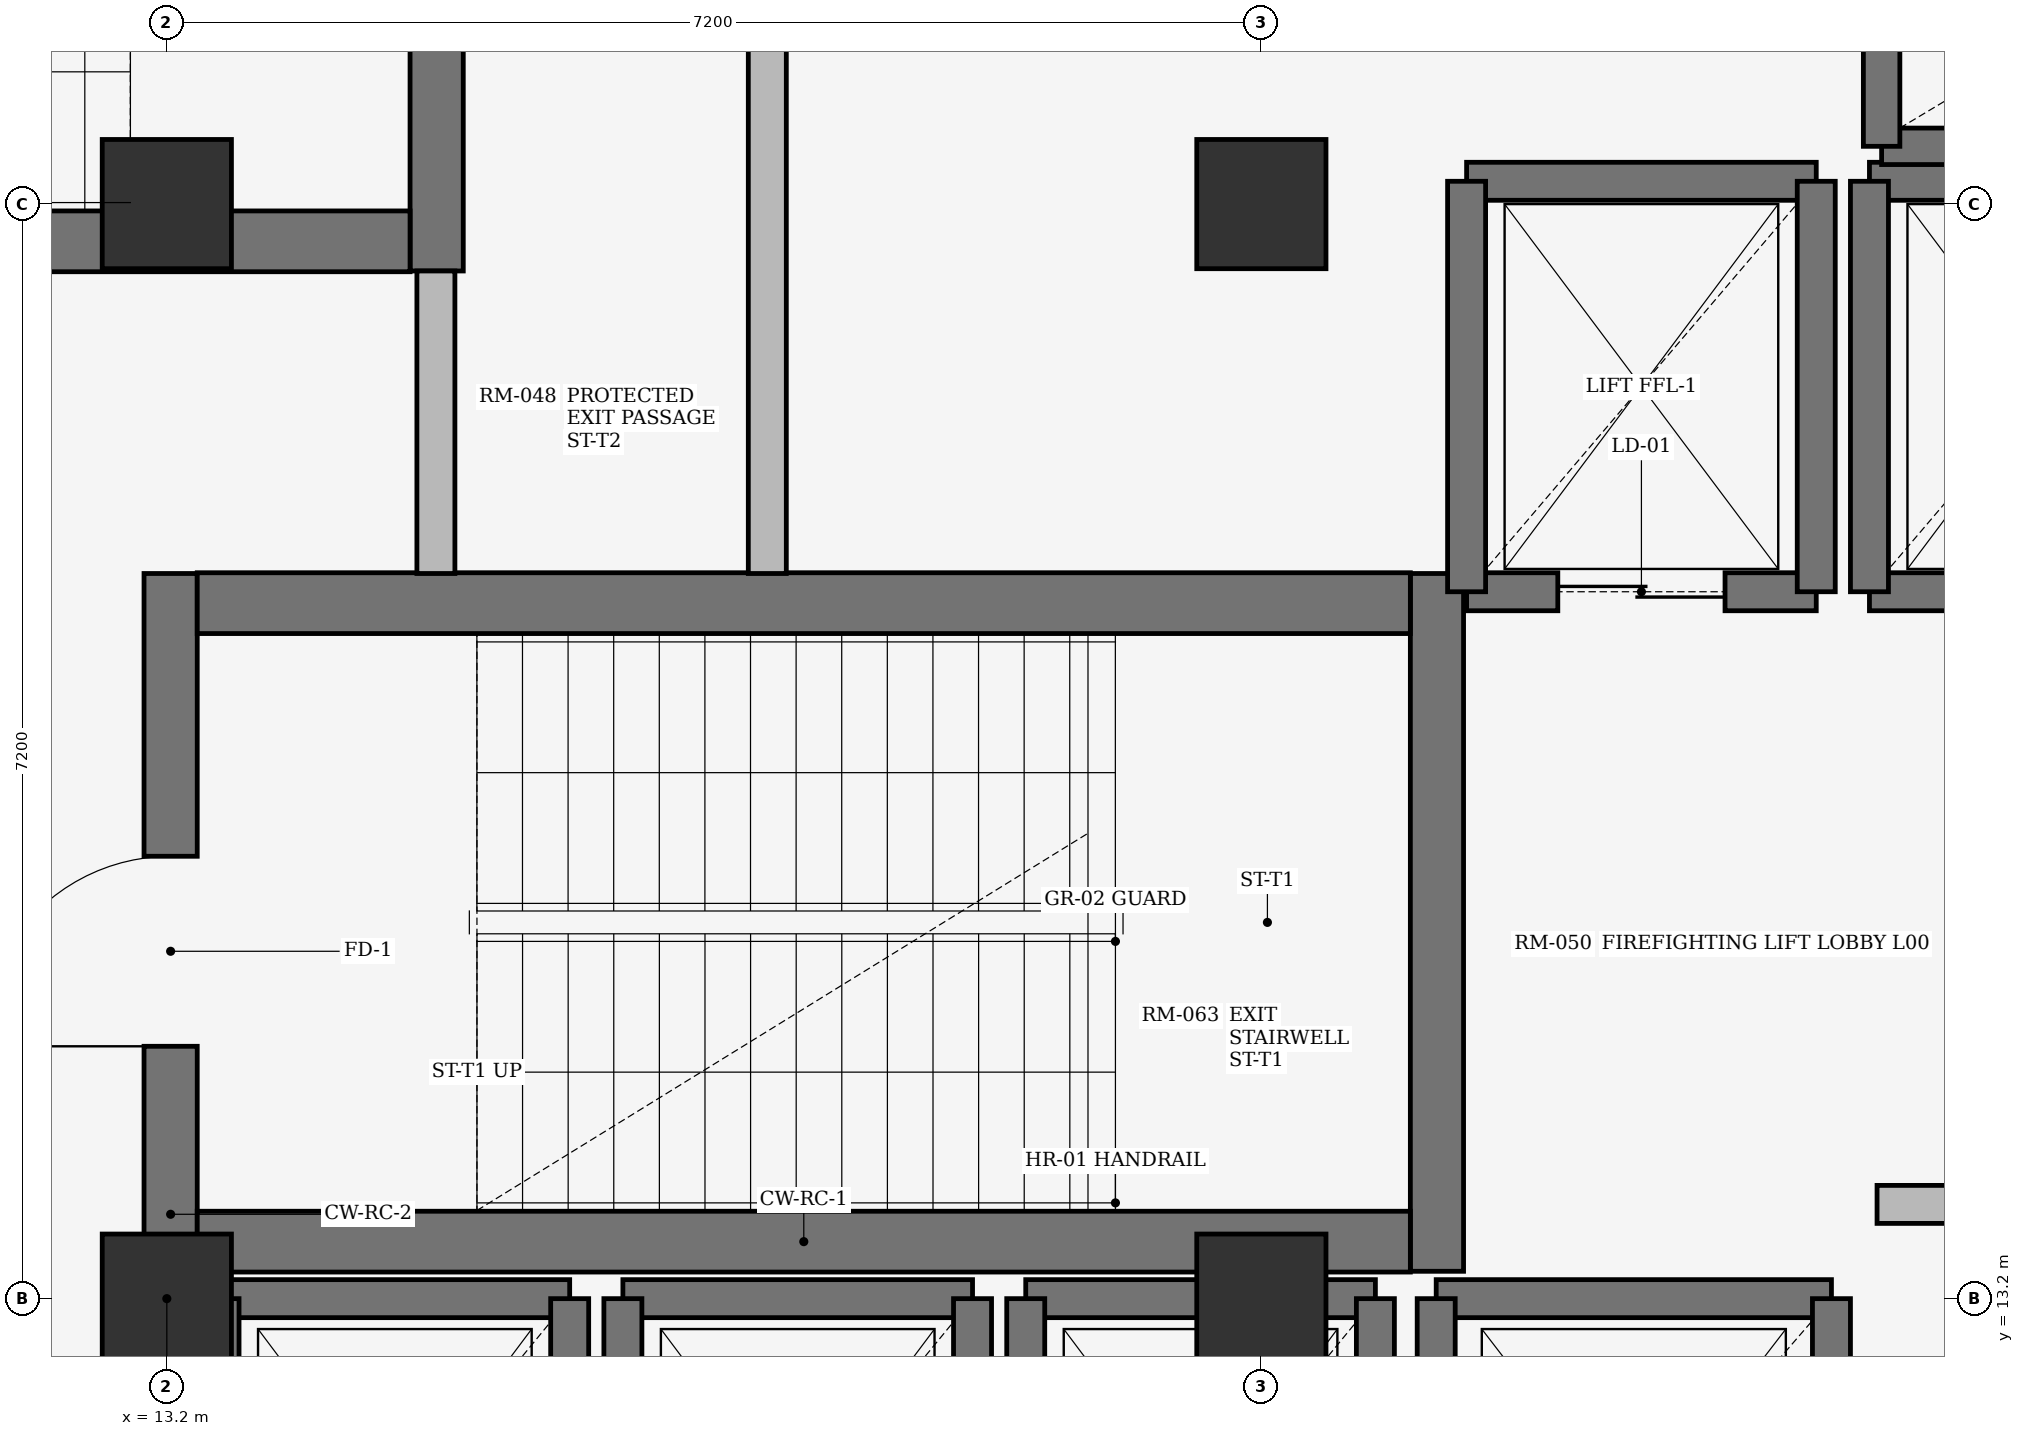
"""IFC4 building model, lengths in metres.
Left out: names, types, materials, properties, quantities, classifications, styles, units other than length and angle.
Written with IfcOpenShell. Run it as: python <this file> out.ifc"""

import sys

from ifc_helpers import new_model, si_unit, direction, frame, frame_2d, origin, origin_2d, place, context, subcontext, project, spatial, rectangle, extrude, element, fill, save


model = new_model("IFC4")
c1 = context("Model", 3, precision=1e-05, world=origin(), true_north=direction((0.0, 1.0)))
c2 = subcontext(c1, "Body", "Model", "MODEL_VIEW")
j1 = project(units=[si_unit("LENGTHUNIT", "METRE"), si_unit("PLANEANGLEUNIT", "RADIAN")], contexts=[c1])
p1 = place(None, origin())
s1 = spatial("IfcSite", under=j1, at=p1, CompositionType="ELEMENT")
p2 = place(p1, origin())
s2 = spatial("IfcBuilding", under=s1, at=p2, CompositionType="ELEMENT")
p3 = place(p2, origin())
s3 = spatial("IfcBuildingStorey", under=s2, at=p3, CompositionType="ELEMENT", Elevation=0.0)
for number, where, z_axis, x_axis in (
    (1, (13.2, 13.2, 0.0), (0.0, 0.0, 1.0), (1.0, 0.0, 0.0)),
    (2, (13.2, 20.4, 0.0), (0.0, 0.0, 1.0), (1.0, 0.0, 0.0)),
    (3, (20.4, 13.2, 0.0), (0.0, 0.0, 1.0), (1.0, 0.0, 0.0)),
    (4, (20.4, 20.4, 0.0), (0.0, 0.0, 1.0), (1.0, 0.0, 0.0)),
):
    element("IfcColumn", number, at=place(p3, frame(where, z_axis=z_axis, x_axis=x_axis)), inside=s3, PredefinedType="COLUMN", context=c2, shape_type="SweptSolid", body=[
        extrude(rectangle(XDim=0.85, YDim=0.85, at=origin_2d()), origin(), (0.0, 0.0, 1.0), 4.48),
    ])
p4 = place(p3, frame((13.225, 13.0, 0.0), z_axis=(0.0, 0.0, 1.0), x_axis=(0.0, 1.0, 0.0)))
e5 = element("IfcWall", 5, at=p4, inside=s3, PredefinedType="SHEAR", context=c2, shape_type="SweptSolid", body=[
    extrude(rectangle(XDim=4.97, YDim=0.35, at=frame_2d((2.485, 0.0))), origin(), (0.0, 0.0, 1.0), 4.48),
])
p5 = place(p4, frame((1.86, 0.0, 0.0)))
e6 = element("IfcOpeningElement", 6, at=p5, cuts=e5, PredefinedType="OPENING", context=c2, shape_type="SweptSolid", body=[
    extrude(rectangle(XDim=1.25, YDim=2.2, at=frame_2d((0.625, 1.1))), frame((0.0, 0.185, 0.0), z_axis=(0.0, -1.0, 0.0), x_axis=(1.0, 0.0, 0.0)), (0.0, 0.0, 1.0), 0.37),
])
p6 = place(p3, frame((21.555, 13.38, 0.0), z_axis=(0.0, 0.0, 1.0), x_axis=(0.0, 1.0, 0.0)))
e7 = element("IfcWall", 7, at=p6, inside=s3, PredefinedType="SHEAR", context=c2, shape_type="SweptSolid", body=[
    extrude(rectangle(XDim=4.59, YDim=0.35, at=frame_2d((2.295, 0.0))), origin(), (0.0, 0.0, 1.0), 4.48),
])
for number, where, z_axis, x_axis in (
    (8, (13.4, 13.575, 0.0), (0.0, 0.0, 1.0), (1.0, 0.0, 0.0)),
    (9, (13.4, 17.775, 0.0), (0.0, 0.0, 1.0), (1.0, 0.0, 0.0)),
):
    element("IfcWall", number, at=place(p3, frame(where, z_axis=z_axis, x_axis=x_axis)), inside=s3, PredefinedType="SHEAR", context=c2, shape_type="SweptSolid", body=[
        extrude(rectangle(XDim=7.98, YDim=0.4, at=frame_2d((3.99, 0.0))), origin(), (0.0, 0.0, 1.0), 4.48),
    ])
p7 = place(p3, frame((14.975, 24.55, 0.0), z_axis=(0.0, 0.0, 1.0), x_axis=(0.0, -1.0, 0.0)))
e10 = element("IfcWall", 10, at=p7, inside=s3, PredefinedType="SHEAR", context=c2, shape_type="SweptSolid", body=[
    extrude(rectangle(XDim=4.59, YDim=0.35, at=frame_2d((2.295, 0.0))), origin(), (0.0, 0.0, 1.0), 4.48),
])
p8 = place(p7, frame((1.72, 0.0, 0.0)))
e11 = element("IfcOpeningElement", 11, at=p8, cuts=e10, PredefinedType="OPENING", context=c2, shape_type="SweptSolid", body=[
    extrude(rectangle(XDim=1.15, YDim=2.2, at=frame_2d((0.575, 1.1))), frame((0.0, 0.185, 0.0), z_axis=(0.0, -1.0, 0.0), x_axis=(1.0, 0.0, 0.0)), (0.0, 0.0, 1.0), 0.37),
])
p9 = place(p3, frame((14.8, 20.155, 0.0), z_axis=(0.0, 0.0, 1.0), x_axis=(-1.0, 0.0, 0.0)))
e12 = element("IfcWall", 12, at=p9, inside=s3, PredefinedType="SHEAR", context=c2, shape_type="SweptSolid", body=[
    extrude(rectangle(XDim=7.98, YDim=0.4, at=frame_2d((3.99, 0.0))), origin(), (0.0, 0.0, 1.0), 4.48),
])
p10 = place(p3, frame((21.75, 17.85, 0.0), z_axis=(0.0, 0.0, 1.0), x_axis=(1.0, 0.0, 0.0)))
e13 = element("IfcWall", 13, at=p10, inside=s3, PredefinedType="SHEAR", context=c2, shape_type="SweptSolid", body=[
    extrude(rectangle(XDim=2.3, YDim=0.25, at=frame_2d((1.15, 0.0))), origin(), (0.0, 0.0, 1.0), 4.48),
])
p11 = place(p10, frame((0.6, 0.0, 0.0)))
e14 = element("IfcOpeningElement", 14, at=p11, cuts=e13, PredefinedType="OPENING", context=c2, shape_type="SweptSolid", body=[
    extrude(rectangle(XDim=1.1, YDim=2.2, at=frame_2d((0.55, 1.1))), frame((0.0, 0.135, 0.0), z_axis=(0.0, -1.0, 0.0), x_axis=(1.0, 0.0, 0.0)), (0.0, 0.0, 1.0), 0.27),
])
p12 = place(p3, frame((21.75, 20.55, 0.0), z_axis=(0.0, 0.0, 1.0), x_axis=(1.0, 0.0, 0.0)))
e15 = element("IfcWall", 15, at=p12, inside=s3, PredefinedType="SHEAR", context=c2, shape_type="SweptSolid", body=[
    extrude(rectangle(XDim=2.3, YDim=0.25, at=frame_2d((1.15, 0.0))), origin(), (0.0, 0.0, 1.0), 4.48),
])
for number, where, z_axis, x_axis in (
    (16, (21.75, 17.85, 0.0), (0.0, 0.0, 1.0), (0.0, 1.0, 0.0)),
    (17, (24.05, 17.85, 0.0), (0.0, 0.0, 1.0), (0.0, 1.0, 0.0)),
):
    element("IfcWall", number, at=place(p3, frame(where, z_axis=z_axis, x_axis=x_axis)), inside=s3, PredefinedType="SHEAR", context=c2, shape_type="SweptSolid", body=[
        extrude(rectangle(XDim=2.7, YDim=0.25, at=frame_2d((1.35, 0.0))), origin(), (0.0, 0.0, 1.0), 4.48),
    ])
p13 = place(p3, frame((24.4, 17.85, 0.0), z_axis=(0.0, 0.0, 1.0), x_axis=(1.0, 0.0, 0.0)))
e18 = element("IfcWall", 18, at=p13, inside=s3, PredefinedType="SHEAR", context=c2, shape_type="SweptSolid", body=[
    extrude(rectangle(XDim=2.3, YDim=0.25, at=frame_2d((1.15, 0.0))), origin(), (0.0, 0.0, 1.0), 4.48),
])
p14 = place(p13, frame((0.6, 0.0, 0.0)))
e19 = element("IfcOpeningElement", 19, at=p14, cuts=e18, PredefinedType="OPENING", context=c2, shape_type="SweptSolid", body=[
    extrude(rectangle(XDim=1.1, YDim=2.2, at=frame_2d((0.55, 1.1))), frame((0.0, 0.135, 0.0), z_axis=(0.0, -1.0, 0.0), x_axis=(1.0, 0.0, 0.0)), (0.0, 0.0, 1.0), 0.27),
])
p15 = place(p3, frame((24.4, 20.55, 0.0), z_axis=(0.0, 0.0, 1.0), x_axis=(1.0, 0.0, 0.0)))
e20 = element("IfcWall", 20, at=p15, inside=s3, PredefinedType="SHEAR", context=c2, shape_type="SweptSolid", body=[
    extrude(rectangle(XDim=2.3, YDim=0.25, at=frame_2d((1.15, 0.0))), origin(), (0.0, 0.0, 1.0), 4.48),
])
p16 = place(p3, frame((24.4, 17.85, 0.0), z_axis=(0.0, 0.0, 1.0), x_axis=(0.0, 1.0, 0.0)))
e21 = element("IfcWall", 21, at=p16, inside=s3, PredefinedType="SHEAR", context=c2, shape_type="SweptSolid", body=[
    extrude(rectangle(XDim=2.7, YDim=0.25, at=frame_2d((1.35, 0.0))), origin(), (0.0, 0.0, 1.0), 4.48),
])
p17 = place(p3, frame((13.55, 13.2, 0.0), z_axis=(0.0, 0.0, 1.0), x_axis=(1.0, 0.0, 0.0)))
e22 = element("IfcWall", 22, at=p17, inside=s3, PredefinedType="SHEAR", context=c2, shape_type="SweptSolid", body=[
    extrude(rectangle(XDim=2.3, YDim=0.25, at=frame_2d((1.15, 0.0))), origin(), (0.0, 0.0, 1.0), 4.48),
])
for number, where, z_axis, x_axis in (
    (23, (13.55, 10.4, 0.0), (0.0, 0.0, 1.0), (0.0, 1.0, 0.0)),
    (24, (15.85, 10.4, 0.0), (0.0, 0.0, 1.0), (0.0, 1.0, 0.0)),
):
    element("IfcWall", number, at=place(p3, frame(where, z_axis=z_axis, x_axis=x_axis)), inside=s3, PredefinedType="SHEAR", context=c2, shape_type="SweptSolid", body=[
        extrude(rectangle(XDim=2.8, YDim=0.25, at=frame_2d((1.4, 0.0))), origin(), (0.0, 0.0, 1.0), 4.48),
    ])
p18 = place(p3, frame((16.2, 13.2, 0.0), z_axis=(0.0, 0.0, 1.0), x_axis=(1.0, 0.0, 0.0)))
e25 = element("IfcWall", 25, at=p18, inside=s3, PredefinedType="SHEAR", context=c2, shape_type="SweptSolid", body=[
    extrude(rectangle(XDim=2.3, YDim=0.25, at=frame_2d((1.15, 0.0))), origin(), (0.0, 0.0, 1.0), 4.48),
])
for number, where, z_axis, x_axis in (
    (26, (16.2, 10.4, 0.0), (0.0, 0.0, 1.0), (0.0, 1.0, 0.0)),
    (27, (18.5, 10.4, 0.0), (0.0, 0.0, 1.0), (0.0, 1.0, 0.0)),
):
    element("IfcWall", number, at=place(p3, frame(where, z_axis=z_axis, x_axis=x_axis)), inside=s3, PredefinedType="SHEAR", context=c2, shape_type="SweptSolid", body=[
        extrude(rectangle(XDim=2.8, YDim=0.25, at=frame_2d((1.4, 0.0))), origin(), (0.0, 0.0, 1.0), 4.48),
    ])
p19 = place(p3, frame((18.85, 13.2, 0.0), z_axis=(0.0, 0.0, 1.0), x_axis=(1.0, 0.0, 0.0)))
e28 = element("IfcWall", 28, at=p19, inside=s3, PredefinedType="SHEAR", context=c2, shape_type="SweptSolid", body=[
    extrude(rectangle(XDim=2.3, YDim=0.25, at=frame_2d((1.15, 0.0))), origin(), (0.0, 0.0, 1.0), 4.48),
])
for number, where, z_axis, x_axis in (
    (29, (18.85, 10.4, 0.0), (0.0, 0.0, 1.0), (0.0, 1.0, 0.0)),
    (30, (21.15, 10.4, 0.0), (0.0, 0.0, 1.0), (0.0, 1.0, 0.0)),
):
    element("IfcWall", number, at=place(p3, frame(where, z_axis=z_axis, x_axis=x_axis)), inside=s3, PredefinedType="SHEAR", context=c2, shape_type="SweptSolid", body=[
        extrude(rectangle(XDim=2.8, YDim=0.25, at=frame_2d((1.4, 0.0))), origin(), (0.0, 0.0, 1.0), 4.48),
    ])
p20 = place(p3, frame((21.55, 13.2, 0.0), z_axis=(0.0, 0.0, 1.0), x_axis=(1.0, 0.0, 0.0)))
e31 = element("IfcWall", 31, at=p20, inside=s3, PredefinedType="SHEAR", context=c2, shape_type="SweptSolid", body=[
    extrude(rectangle(XDim=2.6, YDim=0.25, at=frame_2d((1.3, 0.0))), origin(), (0.0, 0.0, 1.0), 4.48),
])
for number, where, z_axis, x_axis in (
    (32, (21.55, 10.2, 0.0), (0.0, 0.0, 1.0), (0.0, 1.0, 0.0)),
    (33, (24.15, 10.2, 0.0), (0.0, 0.0, 1.0), (0.0, 1.0, 0.0)),
):
    element("IfcWall", number, at=place(p3, frame(where, z_axis=z_axis, x_axis=x_axis)), inside=s3, PredefinedType="SHEAR", context=c2, shape_type="SweptSolid", body=[
        extrude(rectangle(XDim=3.0, YDim=0.25, at=frame_2d((1.5, 0.0))), origin(), (0.0, 0.0, 1.0), 4.48),
    ])
p21 = place(p3, frame((24.48, 20.78, 0.0), z_axis=(0.0, 0.0, 1.0), x_axis=(1.0, 0.0, 0.0)))
e34 = element("IfcWall", 34, at=p21, inside=s3, PredefinedType="SHEAR", context=c2, shape_type="SweptSolid", body=[
    extrude(rectangle(XDim=2.24, YDim=0.24, at=frame_2d((1.12, 0.0))), origin(), (0.0, 0.0, 1.0), 4.48),
])
p22 = place(p3, frame((24.48, 20.78, 0.0), z_axis=(0.0, 0.0, 1.0), x_axis=(0.0, 1.0, 0.0)))
e35 = element("IfcWall", 35, at=p22, inside=s3, PredefinedType="SHEAR", context=c2, shape_type="SweptSolid", body=[
    extrude(rectangle(XDim=2.94, YDim=0.24, at=frame_2d((1.47, 0.0))), origin(), (0.0, 0.0, 1.0), 4.48),
])
p23 = place(p3, frame((24.45, 13.82, 0.0), z_axis=(0.0, 0.0, 1.0), x_axis=(1.0, 0.0, 0.0)))
e36 = element("IfcWall", 36, at=p23, inside=s3, PredefinedType="SOLIDWALL", context=c2, shape_type="SweptSolid", body=[
    extrude(rectangle(XDim=2.0, YDim=0.25, at=frame_2d((1.0, 0.0))), origin(), (0.0, 0.0, 1.0), 4.46),
])
p24 = place(p3, frame((17.15, 17.97, 0.0), z_axis=(0.0, 0.0, 1.0), x_axis=(0.0, 1.0, 0.0)))
e37 = element("IfcWall", 37, at=p24, inside=s3, PredefinedType="SOLIDWALL", context=c2, shape_type="SweptSolid", body=[
    extrude(rectangle(XDim=9.105, YDim=0.25, at=frame_2d((4.552, 0.0))), origin(), (0.0, 0.0, 1.0), 4.46),
])
p25 = place(p24, frame((7.03, 0.0, 0.0)))
e38 = element("IfcOpeningElement", 38, at=p25, cuts=e37, PredefinedType="OPENING", context=c2, shape_type="SweptSolid", body=[
    extrude(rectangle(XDim=1.25, YDim=2.2, at=frame_2d((0.625, 1.1))), frame((0.0, 0.135, 0.0), z_axis=(0.0, -1.0, 0.0), x_axis=(1.0, 0.0, 0.0)), (0.0, 0.0, 1.0), 0.27),
])
p26 = place(p3, frame((14.97, 17.97, 0.0), z_axis=(0.0, 0.0, 1.0), x_axis=(0.0, 1.0, 0.0)))
e39 = element("IfcWall", 39, at=p26, inside=s3, PredefinedType="SOLIDWALL", context=c2, shape_type="SweptSolid", body=[
    extrude(rectangle(XDim=1.99, YDim=0.25, at=frame_2d((0.995, 0.0))), origin(), (0.0, 0.0, 1.0), 4.46),
])
p27 = place(p5, origin())
e40 = element("IfcDoor", 40, at=p27, inside=s3, OperationType="SINGLE_SWING_LEFT", PredefinedType="DOOR", context=c2, shape_type="SweptSolid", body=[
    extrude(rectangle(XDim=1.25, YDim=2.2, at=frame_2d((0.625, 1.1))), frame((0.0, 0.025, 0.0), z_axis=(0.0, -1.0, 0.0), x_axis=(1.0, 0.0, 0.0)), (0.0, 0.0, 1.0), 0.05),
])
fill(e6, e40)
p28 = place(p11, origin())
e41 = element("IfcDoor", 41, at=p28, inside=s3, OperationType="DOUBLE_DOOR_SLIDING", PredefinedType="DOOR", context=c2, shape_type="SweptSolid", body=[
    extrude(rectangle(XDim=1.1, YDim=2.2, at=frame_2d((0.55, 1.1))), frame((0.0, 0.025, 0.0), z_axis=(0.0, -1.0, 0.0), x_axis=(1.0, 0.0, 0.0)), (0.0, 0.0, 1.0), 0.05),
])
fill(e14, e41)
save(model, sys.argv[1])
